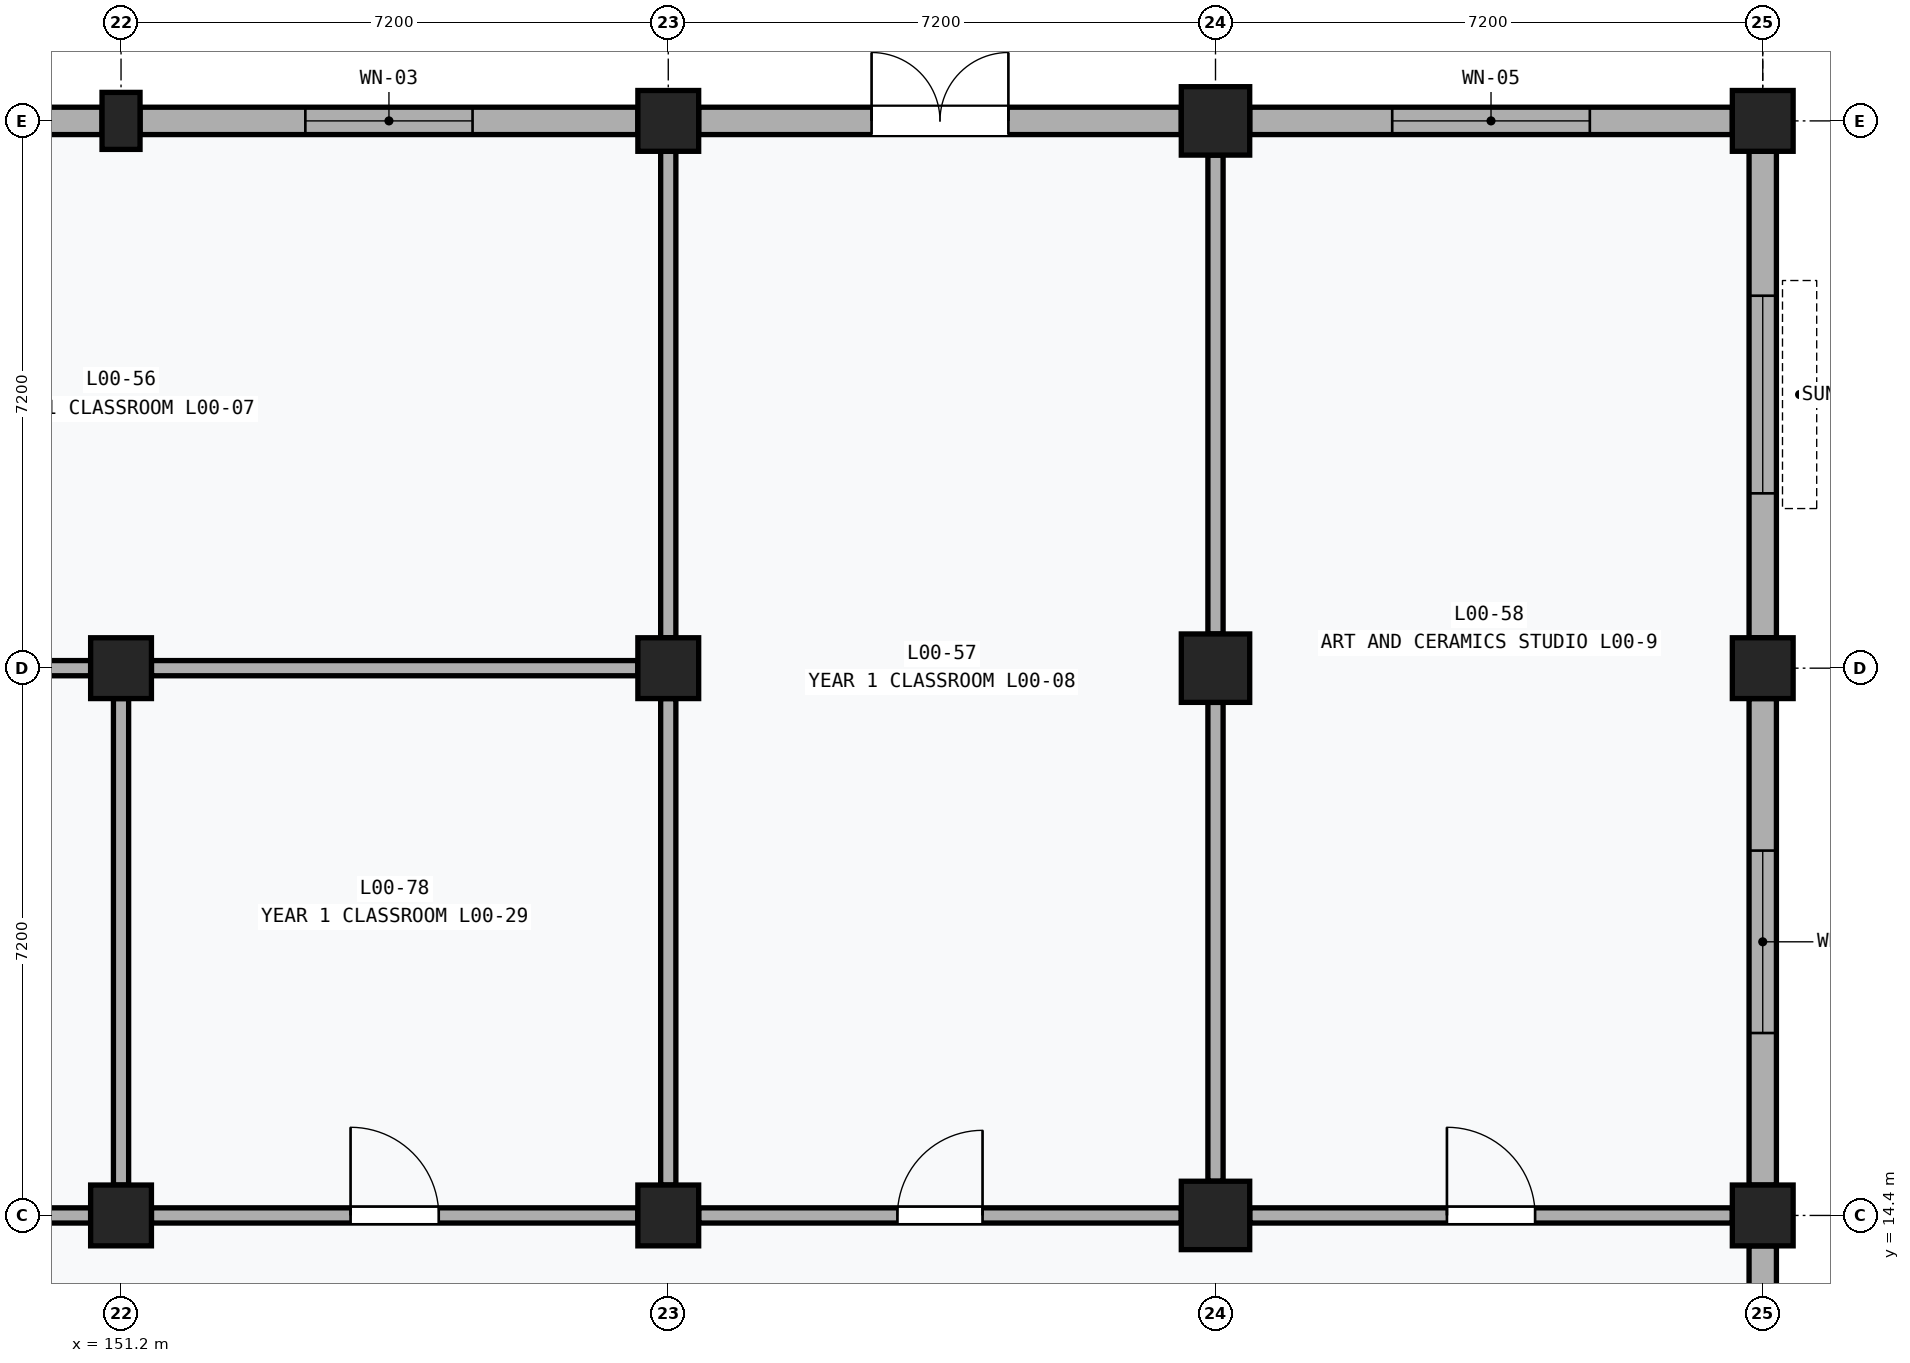
"""IFC4 building model, lengths in metres.
Left out: names, types, materials, properties, quantities, classifications, styles, units other than length and angle.
Written with IfcOpenShell. Run it as: python <this file> out.ifc"""

import sys

from ifc_helpers import new_model, si_unit, direction, frame, frame_2d, origin, origin_2d, place, context, subcontext, project, spatial, rectangle, extrude, element, fill, save


model = new_model("IFC4")
c1 = context("Model", 3, precision=1e-05, world=origin(), true_north=direction((0.0, 1.0)))
c2 = subcontext(c1, "Body", "Model", "MODEL_VIEW")
j1 = project(units=[si_unit("LENGTHUNIT", "METRE"), si_unit("PLANEANGLEUNIT", "RADIAN")], contexts=[c1])
p1 = place(None, origin())
s1 = spatial("IfcSite", under=j1, at=p1, CompositionType="ELEMENT")
p2 = place(p1, origin())
s2 = spatial("IfcBuilding", under=s1, at=p2, CompositionType="ELEMENT")
p3 = place(p2, origin())
s3 = spatial("IfcBuildingStorey", under=s2, at=p3, CompositionType="ELEMENT", Elevation=0.0)
for number, where, z_axis, x_axis in (
    (1, (151.2, 14.4, 0.0), (0.0, 0.0, 1.0), (1.0, 0.0, 0.0)),
    (2, (151.2, 21.6, 0.0), (0.0, 0.0, 1.0), (1.0, 0.0, 0.0)),
):
    element("IfcColumn", number, at=place(p3, frame(where, z_axis=z_axis, x_axis=x_axis)), inside=s3, PredefinedType="COLUMN", context=c2, shape_type="SweptSolid", body=[
        extrude(rectangle(XDim=0.8, YDim=0.8, at=origin_2d()), origin(), (0.0, 0.0, 1.0), 4.8),
    ])
p4 = place(p3, frame((151.2, 28.8, 0.0), z_axis=(0.0, 0.0, 1.0), x_axis=(1.0, 0.0, 0.0)))
e3 = element("IfcColumn", 3, at=p4, inside=s3, PredefinedType="PILASTER", context=c2, shape_type="SweptSolid", body=[
    extrude(rectangle(XDim=0.5, YDim=0.75, at=origin_2d()), origin(), (0.0, 0.0, 1.0), 4.8),
])
for number, where, z_axis, x_axis in (
    (4, (158.4, 14.4, 0.0), (0.0, 0.0, 1.0), (1.0, 0.0, 0.0)),
    (5, (158.4, 21.6, 0.0), (0.0, 0.0, 1.0), (1.0, 0.0, 0.0)),
    (6, (158.4, 28.8, 0.0), (0.0, 0.0, 1.0), (1.0, 0.0, 0.0)),
):
    element("IfcColumn", number, at=place(p3, frame(where, z_axis=z_axis, x_axis=x_axis)), inside=s3, PredefinedType="COLUMN", context=c2, shape_type="SweptSolid", body=[
        extrude(rectangle(XDim=0.8, YDim=0.8, at=origin_2d()), origin(), (0.0, 0.0, 1.0), 4.8),
    ])
for number, where, z_axis, x_axis in (
    (7, (165.6, 14.4, 0.0), (0.0, 0.0, 1.0), (1.0, 0.0, 0.0)),
    (8, (165.6, 21.6, 0.0), (0.0, 0.0, 1.0), (1.0, 0.0, 0.0)),
    (9, (165.6, 28.8, 0.0), (0.0, 0.0, 1.0), (1.0, 0.0, 0.0)),
):
    element("IfcColumn", number, at=place(p3, frame(where, z_axis=z_axis, x_axis=x_axis)), inside=s3, PredefinedType="COLUMN", context=c2, shape_type="SweptSolid", body=[
        extrude(rectangle(XDim=0.9, YDim=0.9, at=origin_2d()), origin(), (0.0, 0.0, 1.0), 4.8),
    ])
for number, where, z_axis, x_axis in (
    (10, (172.8, 14.4, 0.0), (0.0, 0.0, 1.0), (1.0, 0.0, 0.0)),
    (11, (172.8, 21.6, 0.0), (0.0, 0.0, 1.0), (1.0, 0.0, 0.0)),
    (12, (172.8, 28.8, 0.0), (0.0, 0.0, 1.0), (1.0, 0.0, 0.0)),
):
    element("IfcColumn", number, at=place(p3, frame(where, z_axis=z_axis, x_axis=x_axis)), inside=s3, PredefinedType="COLUMN", context=c2, shape_type="SweptSolid", body=[
        extrude(rectangle(XDim=0.8, YDim=0.8, at=origin_2d()), origin(), (0.0, 0.0, 1.0), 4.8),
    ])
p5 = place(p3, frame((144.4, 28.8, 0.0), z_axis=(0.0, 0.0, 1.0), x_axis=(1.0, 0.0, 0.0)))
e13 = element("IfcWall", 13, at=p5, inside=s3, PredefinedType="SOLIDWALL", context=c2, shape_type="SweptSolid", body=[
    extrude(rectangle(XDim=6.55, YDim=0.36, at=frame_2d((3.275, 0.0))), origin(), (0.0, 0.0, 1.0), 3.89),
])
p6 = place(p5, frame((2.275, 0.0, 0.9)))
e14 = element("IfcOpeningElement", 14, at=p6, cuts=e13, PredefinedType="OPENING", context=c2, shape_type="SweptSolid", body=[
    extrude(rectangle(XDim=2.0, YDim=1.8, at=frame_2d((1.0, 0.9))), frame((0.0, 0.192, 0.0), z_axis=(0.0, -1.0, 0.0), x_axis=(1.0, 0.0, 0.0)), (0.0, 0.0, 1.0), 0.384),
])
p7 = place(p3, frame((151.45, 28.8, 0.0), z_axis=(0.0, 0.0, 1.0), x_axis=(1.0, 0.0, 0.0)))
e15 = element("IfcWall", 15, at=p7, inside=s3, PredefinedType="SOLIDWALL", context=c2, shape_type="SweptSolid", body=[
    extrude(rectangle(XDim=6.55, YDim=0.36, at=frame_2d((3.275, 0.0))), origin(), (0.0, 0.0, 1.0), 3.89),
])
p8 = place(p7, frame((2.175, 0.0, 0.9)))
e16 = element("IfcOpeningElement", 16, at=p8, cuts=e15, PredefinedType="OPENING", context=c2, shape_type="SweptSolid", body=[
    extrude(rectangle(XDim=2.2, YDim=1.8, at=frame_2d((1.1, 0.9))), frame((0.0, 0.192, 0.0), z_axis=(0.0, -1.0, 0.0), x_axis=(1.0, 0.0, 0.0)), (0.0, 0.0, 1.0), 0.384),
])
p9 = place(p3, frame((158.8, 28.8, 0.0), z_axis=(0.0, 0.0, 1.0), x_axis=(1.0, 0.0, 0.0)))
e17 = element("IfcWall", 17, at=p9, inside=s3, PredefinedType="SOLIDWALL", context=c2, shape_type="SweptSolid", body=[
    extrude(rectangle(XDim=6.35, YDim=0.36, at=frame_2d((3.175, 0.0))), origin(), (0.0, 0.0, 1.0), 3.89),
])
p10 = place(p9, frame((2.275, 0.0, 0.0)))
e18 = element("IfcOpeningElement", 18, at=p10, cuts=e17, PredefinedType="OPENING", context=c2, shape_type="SweptSolid", body=[
    extrude(rectangle(XDim=1.8, YDim=2.35, at=frame_2d((0.9, 1.175))), frame((0.0, 0.192, 0.0), z_axis=(0.0, -1.0, 0.0), x_axis=(1.0, 0.0, 0.0)), (0.0, 0.0, 1.0), 0.384),
])
p11 = place(p3, frame((172.8, 7.575, 0.0), z_axis=(0.0, 0.0, 1.0), x_axis=(0.0, 1.0, 0.0)))
e19 = element("IfcWall", 19, at=p11, inside=s3, PredefinedType="SOLIDWALL", context=c2, shape_type="SweptSolid", body=[
    extrude(rectangle(XDim=6.425, YDim=0.36, at=frame_2d((3.212, 0.0))), origin(), (0.0, 0.0, 1.0), 3.89),
])
p12 = place(p11, frame((2.113, 0.0, 0.9)))
e20 = element("IfcOpeningElement", 20, at=p12, cuts=e19, PredefinedType="OPENING", context=c2, shape_type="SweptSolid", body=[
    extrude(rectangle(XDim=2.2, YDim=1.8, at=frame_2d((1.1, 0.9))), frame((0.0, 0.192, 0.0), z_axis=(0.0, -1.0, 0.0), x_axis=(1.0, 0.0, 0.0)), (0.0, 0.0, 1.0), 0.384),
])
p13 = place(p3, frame((172.8, 14.8, 0.0), z_axis=(0.0, 0.0, 1.0), x_axis=(0.0, 1.0, 0.0)))
e21 = element("IfcWall", 21, at=p13, inside=s3, PredefinedType="SOLIDWALL", context=c2, shape_type="SweptSolid", body=[
    extrude(rectangle(XDim=6.4, YDim=0.36, at=frame_2d((3.2, 0.0))), origin(), (0.0, 0.0, 1.0), 3.89),
])
p14 = place(p13, frame((2.0, 0.0, 0.9)))
e22 = element("IfcOpeningElement", 22, at=p14, cuts=e21, PredefinedType="OPENING", context=c2, shape_type="SweptSolid", body=[
    extrude(rectangle(XDim=2.4, YDim=1.8, at=frame_2d((1.2, 0.9))), frame((0.0, 0.192, 0.0), z_axis=(0.0, -1.0, 0.0), x_axis=(1.0, 0.0, 0.0)), (0.0, 0.0, 1.0), 0.384),
])
p15 = place(p3, frame((166.05, 28.8, 0.0), z_axis=(0.0, 0.0, 1.0), x_axis=(1.0, 0.0, 0.0)))
e23 = element("IfcWall", 23, at=p15, inside=s3, PredefinedType="SOLIDWALL", context=c2, shape_type="SweptSolid", body=[
    extrude(rectangle(XDim=6.35, YDim=0.36, at=frame_2d((3.175, 0.0))), origin(), (0.0, 0.0, 1.0), 3.89),
])
p16 = place(p15, frame((1.875, 0.0, 0.9)))
e24 = element("IfcOpeningElement", 24, at=p16, cuts=e23, PredefinedType="OPENING", context=c2, shape_type="SweptSolid", body=[
    extrude(rectangle(XDim=2.6, YDim=1.8, at=frame_2d((1.3, 0.9))), frame((0.0, 0.192, 0.0), z_axis=(0.0, -1.0, 0.0), x_axis=(1.0, 0.0, 0.0)), (0.0, 0.0, 1.0), 0.384),
])
p17 = place(p3, frame((172.8, 22.0, 0.0), z_axis=(0.0, 0.0, 1.0), x_axis=(0.0, 1.0, 0.0)))
e25 = element("IfcWall", 25, at=p17, inside=s3, PredefinedType="SOLIDWALL", context=c2, shape_type="SweptSolid", body=[
    extrude(rectangle(XDim=6.4, YDim=0.36, at=frame_2d((3.2, 0.0))), origin(), (0.0, 0.0, 1.0), 3.89),
])
p18 = place(p17, frame((1.9, 0.0, 0.9)))
e26 = element("IfcOpeningElement", 26, at=p18, cuts=e25, PredefinedType="OPENING", context=c2, shape_type="SweptSolid", body=[
    extrude(rectangle(XDim=2.6, YDim=1.8, at=frame_2d((1.3, 0.9))), frame((0.0, 0.192, 0.0), z_axis=(0.0, -1.0, 0.0), x_axis=(1.0, 0.0, 0.0)), (0.0, 0.0, 1.0), 0.384),
])
p19 = place(p3, frame((144.4, 21.6, 0.0), z_axis=(0.0, 0.0, 1.0), x_axis=(1.0, 0.0, 0.0)))
e27 = element("IfcWall", 27, at=p19, inside=s3, PredefinedType="PARTITIONING", context=c2, shape_type="SweptSolid", body=[
    extrude(rectangle(XDim=6.4, YDim=0.2, at=frame_2d((3.2, 0.0))), origin(), (0.0, 0.0, 1.0), 3.62),
])
for number, where, z_axis, x_axis in (
    (28, (151.6, 21.6, 0.0), (0.0, 0.0, 1.0), (1.0, 0.0, 0.0)),
    (29, (158.4, 22.0, 0.0), (0.0, 0.0, 1.0), (0.0, 1.0, 0.0)),
):
    element("IfcWall", number, at=place(p3, frame(where, z_axis=z_axis, x_axis=x_axis)), inside=s3, PredefinedType="PARTITIONING", context=c2, shape_type="SweptSolid", body=[
        extrude(rectangle(XDim=6.4, YDim=0.2, at=frame_2d((3.2, 0.0))), origin(), (0.0, 0.0, 1.0), 3.62),
    ])
p20 = place(p3, frame((158.8, 14.4, 0.0), z_axis=(0.0, 0.0, 1.0), x_axis=(1.0, 0.0, 0.0)))
e30 = element("IfcWall", 30, at=p20, inside=s3, PredefinedType="PARTITIONING", context=c2, shape_type="SweptSolid", body=[
    extrude(rectangle(XDim=6.35, YDim=0.2, at=frame_2d((3.175, 0.0))), origin(), (0.0, 0.0, 1.0), 3.62),
])
p21 = place(p20, frame((2.615, 0.0, 0.0)))
e31 = element("IfcOpeningElement", 31, at=p21, cuts=e30, PredefinedType="OPENING", context=c2, shape_type="SweptSolid", body=[
    extrude(rectangle(XDim=1.12, YDim=2.2, at=frame_2d((0.56, 1.1))), frame((0.0, 0.112, 0.0), z_axis=(0.0, -1.0, 0.0), x_axis=(1.0, 0.0, 0.0)), (0.0, 0.0, 1.0), 0.224),
])
p22 = place(p3, frame((158.4, 14.8, 0.0), z_axis=(0.0, 0.0, 1.0), x_axis=(0.0, 1.0, 0.0)))
e32 = element("IfcWall", 32, at=p22, inside=s3, PredefinedType="PARTITIONING", context=c2, shape_type="SweptSolid", body=[
    extrude(rectangle(XDim=6.4, YDim=0.2, at=frame_2d((3.2, 0.0))), origin(), (0.0, 0.0, 1.0), 3.62),
])
p23 = place(p3, frame((165.6, 14.85, 0.0), z_axis=(0.0, 0.0, 1.0), x_axis=(0.0, 1.0, 0.0)))
e33 = element("IfcWall", 33, at=p23, inside=s3, PredefinedType="PARTITIONING", context=c2, shape_type="SweptSolid", body=[
    extrude(rectangle(XDim=6.3, YDim=0.2, at=frame_2d((3.15, 0.0))), origin(), (0.0, 0.0, 1.0), 3.62),
])
p24 = place(p3, frame((165.6, 22.05, 0.0), z_axis=(0.0, 0.0, 1.0), x_axis=(0.0, 1.0, 0.0)))
e34 = element("IfcWall", 34, at=p24, inside=s3, PredefinedType="PARTITIONING", context=c2, shape_type="SweptSolid", body=[
    extrude(rectangle(XDim=6.3, YDim=0.2, at=frame_2d((3.15, 0.0))), origin(), (0.0, 0.0, 1.0), 3.62),
])
p25 = place(p3, frame((166.05, 14.4, 0.0), z_axis=(0.0, 0.0, 1.0), x_axis=(1.0, 0.0, 0.0)))
e35 = element("IfcWall", 35, at=p25, inside=s3, PredefinedType="PARTITIONING", context=c2, shape_type="SweptSolid", body=[
    extrude(rectangle(XDim=6.35, YDim=0.2, at=frame_2d((3.175, 0.0))), origin(), (0.0, 0.0, 1.0), 3.62),
])
p26 = place(p25, frame((2.595, 0.0, 0.0)))
e36 = element("IfcOpeningElement", 36, at=p26, cuts=e35, PredefinedType="OPENING", context=c2, shape_type="SweptSolid", body=[
    extrude(rectangle(XDim=1.16, YDim=2.22, at=frame_2d((0.58, 1.11))), frame((0.0, 0.112, 0.0), z_axis=(0.0, -1.0, 0.0), x_axis=(1.0, 0.0, 0.0)), (0.0, 0.0, 1.0), 0.224),
])
p27 = place(p3, frame((144.4, 14.4, 0.0), z_axis=(0.0, 0.0, 1.0), x_axis=(1.0, 0.0, 0.0)))
e37 = element("IfcWall", 37, at=p27, inside=s3, PredefinedType="PARTITIONING", context=c2, shape_type="SweptSolid", body=[
    extrude(rectangle(XDim=6.4, YDim=0.2, at=frame_2d((3.2, 0.0))), origin(), (0.0, 0.0, 1.0), 3.62),
])
p28 = place(p27, frame((2.66, 0.0, 0.0)))
e38 = element("IfcOpeningElement", 38, at=p28, cuts=e37, PredefinedType="OPENING", context=c2, shape_type="SweptSolid", body=[
    extrude(rectangle(XDim=1.08, YDim=2.18, at=frame_2d((0.54, 1.09))), frame((0.0, 0.112, 0.0), z_axis=(0.0, -1.0, 0.0), x_axis=(1.0, 0.0, 0.0)), (0.0, 0.0, 1.0), 0.224),
])
p29 = place(p3, frame((151.2, 14.8, 0.0), z_axis=(0.0, 0.0, 1.0), x_axis=(0.0, 1.0, 0.0)))
e39 = element("IfcWall", 39, at=p29, inside=s3, PredefinedType="PARTITIONING", context=c2, shape_type="SweptSolid", body=[
    extrude(rectangle(XDim=6.4, YDim=0.2, at=frame_2d((3.2, 0.0))), origin(), (0.0, 0.0, 1.0), 3.62),
])
p30 = place(p3, frame((151.6, 14.4, 0.0), z_axis=(0.0, 0.0, 1.0), x_axis=(1.0, 0.0, 0.0)))
e40 = element("IfcWall", 40, at=p30, inside=s3, PredefinedType="PARTITIONING", context=c2, shape_type="SweptSolid", body=[
    extrude(rectangle(XDim=6.4, YDim=0.2, at=frame_2d((3.2, 0.0))), origin(), (0.0, 0.0, 1.0), 3.62),
])
p31 = place(p30, frame((2.62, 0.0, 0.0)))
e41 = element("IfcOpeningElement", 41, at=p31, cuts=e40, PredefinedType="OPENING", context=c2, shape_type="SweptSolid", body=[
    extrude(rectangle(XDim=1.16, YDim=2.22, at=frame_2d((0.58, 1.11))), frame((0.0, 0.112, 0.0), z_axis=(0.0, -1.0, 0.0), x_axis=(1.0, 0.0, 0.0)), (0.0, 0.0, 1.0), 0.224),
])
p32 = place(p8, origin())
e42 = element("IfcWindow", 42, at=p32, inside=s3, PartitioningType="SINGLE_PANEL", PredefinedType="WINDOW", context=c2, shape_type="SweptSolid", body=[
    extrude(rectangle(XDim=2.2, YDim=1.8, at=frame_2d((1.1, 0.9))), frame((0.0, 0.03, 0.0), z_axis=(0.0, -1.0, 0.0), x_axis=(1.0, 0.0, 0.0)), (0.0, 0.0, 1.0), 0.06),
])
fill(e16, e42)
p33 = place(p10, origin())
e43 = element("IfcDoor", 43, at=p33, inside=s3, OperationType="DOUBLE_DOOR_SINGLE_SWING", PredefinedType="DOOR", context=c2, shape_type="SweptSolid", body=[
    extrude(rectangle(XDim=1.8, YDim=2.35, at=frame_2d((0.9, 1.175))), frame((0.0, 0.025, 0.0), z_axis=(0.0, -1.0, 0.0), x_axis=(1.0, 0.0, 0.0)), (0.0, 0.0, 1.0), 0.05),
])
fill(e18, e43)
p34 = place(p14, origin())
e44 = element("IfcWindow", 44, at=p34, inside=s3, PartitioningType="SINGLE_PANEL", PredefinedType="WINDOW", context=c2, shape_type="SweptSolid", body=[
    extrude(rectangle(XDim=2.4, YDim=1.8, at=frame_2d((1.2, 0.9))), frame((0.0, 0.03, 0.0), z_axis=(0.0, -1.0, 0.0), x_axis=(1.0, 0.0, 0.0)), (0.0, 0.0, 1.0), 0.06),
])
fill(e22, e44)
p35 = place(p16, origin())
e45 = element("IfcWindow", 45, at=p35, inside=s3, PartitioningType="SINGLE_PANEL", PredefinedType="WINDOW", context=c2, shape_type="SweptSolid", body=[
    extrude(rectangle(XDim=2.6, YDim=1.8, at=frame_2d((1.3, 0.9))), frame((0.0, 0.03, 0.0), z_axis=(0.0, -1.0, 0.0), x_axis=(1.0, 0.0, 0.0)), (0.0, 0.0, 1.0), 0.06),
])
fill(e24, e45)
p36 = place(p18, origin())
e46 = element("IfcWindow", 46, at=p36, inside=s3, PartitioningType="SINGLE_PANEL", PredefinedType="WINDOW", context=c2, shape_type="SweptSolid", body=[
    extrude(rectangle(XDim=2.6, YDim=1.8, at=frame_2d((1.3, 0.9))), frame((0.0, 0.03, 0.0), z_axis=(0.0, -1.0, 0.0), x_axis=(1.0, 0.0, 0.0)), (0.0, 0.0, 1.0), 0.06),
])
fill(e26, e46)
p37 = place(p21, origin())
e47 = element("IfcDoor", 47, at=p37, inside=s3, OperationType="SINGLE_SWING_RIGHT", PredefinedType="DOOR", context=c2, shape_type="SweptSolid", body=[
    extrude(rectangle(XDim=1.12, YDim=2.2, at=frame_2d((0.56, 1.1))), frame((0.0, 0.025, 0.0), z_axis=(0.0, -1.0, 0.0), x_axis=(1.0, 0.0, 0.0)), (0.0, 0.0, 1.0), 0.05),
])
fill(e31, e47)
p38 = place(p26, origin())
e48 = element("IfcDoor", 48, at=p38, inside=s3, OperationType="SINGLE_SWING_LEFT", PredefinedType="DOOR", context=c2, shape_type="SweptSolid", body=[
    extrude(rectangle(XDim=1.16, YDim=2.22, at=frame_2d((0.58, 1.11))), frame((0.0, 0.025, 0.0), z_axis=(0.0, -1.0, 0.0), x_axis=(1.0, 0.0, 0.0)), (0.0, 0.0, 1.0), 0.05),
])
fill(e36, e48)
p39 = place(p31, origin())
e49 = element("IfcDoor", 49, at=p39, inside=s3, OperationType="SINGLE_SWING_LEFT", PredefinedType="DOOR", context=c2, shape_type="SweptSolid", body=[
    extrude(rectangle(XDim=1.16, YDim=2.22, at=frame_2d((0.58, 1.11))), frame((0.0, 0.025, 0.0), z_axis=(0.0, -1.0, 0.0), x_axis=(1.0, 0.0, 0.0)), (0.0, 0.0, 1.0), 0.05),
])
fill(e41, e49)
save(model, sys.argv[1])
